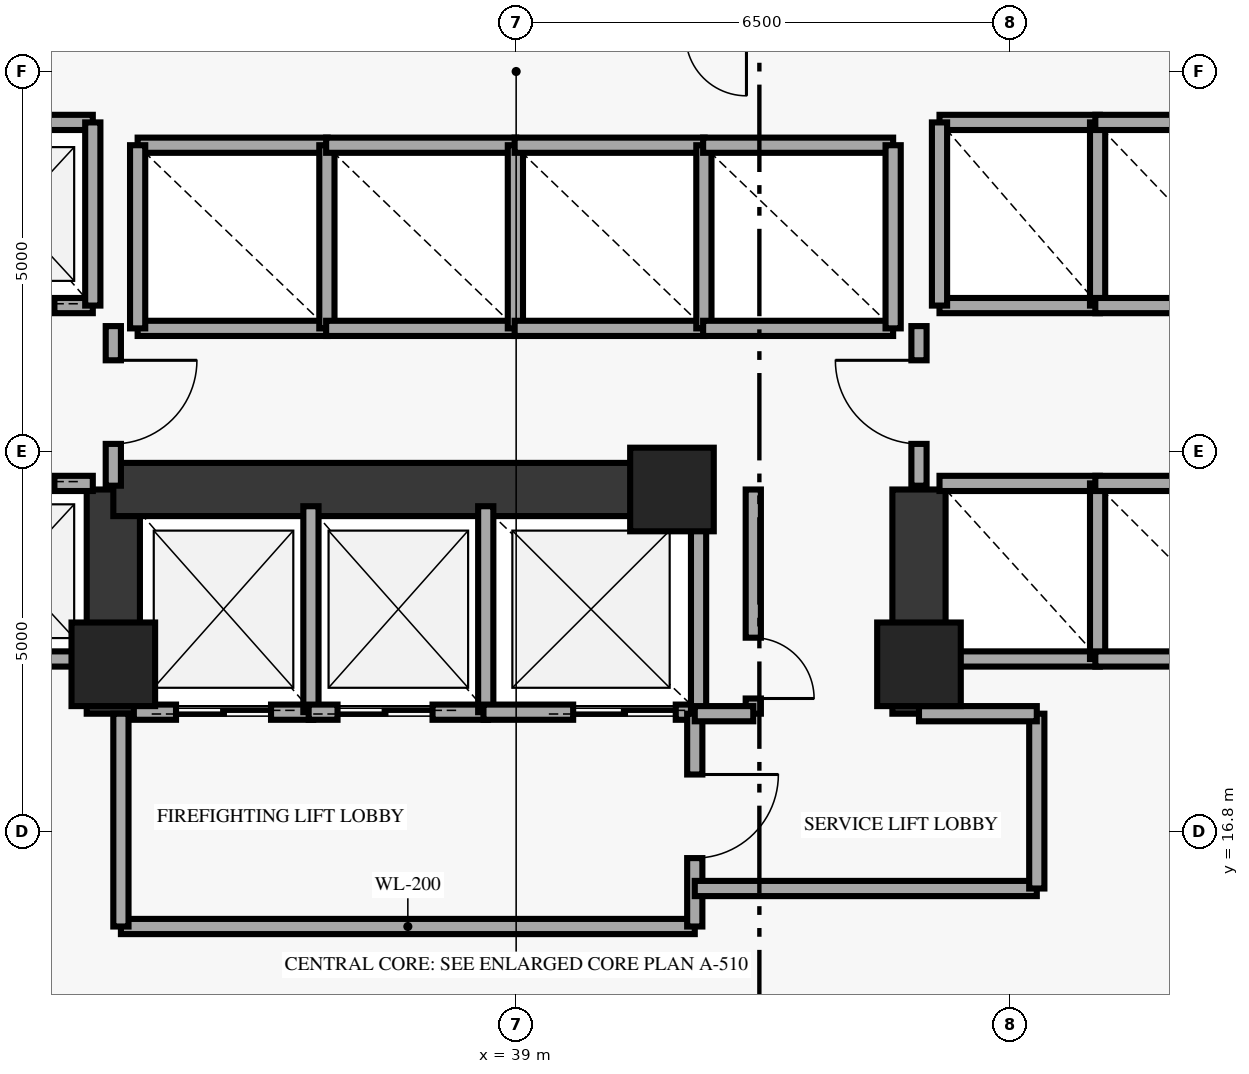
"""IFC4 building model, lengths in metres.
Left out: names, types, materials, properties, quantities, classifications, styles, units other than length and angle.
Written with IfcOpenShell. Run it as: python <this file> out.ifc"""

import sys

from ifc_helpers import new_model, si_unit, direction, frame, frame_2d, origin, origin_2d, place, context, subcontext, project, spatial, rectangle, extrude, element, fill, save


model = new_model("IFC4")
c1 = context("Model", 3, precision=1e-05, world=origin(), true_north=direction((0.0, 1.0)))
c2 = subcontext(c1, "Body", "Model", "MODEL_VIEW")
j1 = project(units=[si_unit("LENGTHUNIT", "METRE"), si_unit("PLANEANGLEUNIT", "RADIAN")], contexts=[c1])
p1 = place(None, origin())
s1 = spatial("IfcSite", under=j1, at=p1, CompositionType="ELEMENT")
p2 = place(p1, origin())
s2 = spatial("IfcBuilding", under=s1, at=p2, CompositionType="ELEMENT")
p3 = place(p2, frame((0.0, 0.0, 65.55)))
s3 = spatial("IfcBuildingStorey", under=s2, at=p3, CompositionType="ELEMENT", Elevation=65.55)
for number, where, z_axis, x_axis in (
    (1, (33.7, 19.0, 0.0), (0.0, 0.0, 1.0), (1.0, 0.0, 0.0)),
    (2, (41.05, 21.3, 0.0), (0.0, 0.0, 1.0), (1.0, 0.0, 0.0)),
    (3, (44.3, 19.0, 0.0), (0.0, 0.0, 1.0), (1.0, 0.0, 0.0)),
):
    element("IfcColumn", number, at=place(p3, frame(where, z_axis=z_axis, x_axis=x_axis)), inside=s3, PredefinedType="PILASTER", context=c2, shape_type="SweptSolid", body=[
        extrude(rectangle(XDim=1.1, YDim=1.1, at=origin_2d()), origin(), (0.0, 0.0, 1.0), 3.8),
    ])
for number, where, z_axis, x_axis in (
    (4, (33.7, 18.35, 0.0), (0.0, 0.0, 1.0), (0.0, 1.0, 0.0)),
    (5, (44.3, 18.35, 0.0), (0.0, 0.0, 1.0), (0.0, 1.0, 0.0)),
):
    element("IfcWall", number, at=place(p3, frame(where, z_axis=z_axis, x_axis=x_axis)), inside=s3, PredefinedType="SHEAR", context=c2, shape_type="SweptSolid", body=[
        extrude(rectangle(XDim=2.95, YDim=0.7, at=frame_2d((1.475, 0.0))), origin(), (0.0, 0.0, 1.0), 3.8),
    ])
p4 = place(p3, frame((33.7, 21.3, 0.0), z_axis=(0.0, 0.0, 1.0), x_axis=(1.0, 0.0, 0.0)))
e6 = element("IfcWall", 6, at=p4, inside=s3, PredefinedType="SHEAR", context=c2, shape_type="SweptSolid", body=[
    extrude(rectangle(XDim=7.55, YDim=0.7, at=frame_2d((3.775, 0.0))), origin(), (0.0, 0.0, 1.0), 3.8),
])
p5 = place(p3, frame((31.32, 23.72, 0.0), z_axis=(0.0, 0.0, 1.0), x_axis=(1.0, 0.0, 0.0)))
e7 = element("IfcWall", 7, at=p5, inside=s3, PredefinedType="SOLIDWALL", context=c2, shape_type="SweptSolid", body=[
    extrude(rectangle(XDim=2.11, YDim=0.2, at=frame_2d((1.055, 0.0))), origin(), (0.0, 0.0, 1.0), 3.8),
])
p6 = place(p5, frame((0.505, 0.0, 0.0)))
e8 = element("IfcOpeningElement", 8, at=p6, cuts=e7, PredefinedType="OPENING", context=c2, shape_type="SweptSolid", body=[
    extrude(rectangle(XDim=1.1, YDim=2.15, at=frame_2d((0.55, 1.075))), frame((0.0, 0.11, 0.0), z_axis=(0.0, -1.0, 0.0), x_axis=(1.0, 0.0, 0.0)), (0.0, 0.0, 1.0), 0.22),
])
p7 = place(p3, frame((31.32, 26.13, 0.0), z_axis=(0.0, 0.0, 1.0), x_axis=(1.0, 0.0, 0.0)))
e9 = element("IfcWall", 9, at=p7, inside=s3, PredefinedType="SOLIDWALL", context=c2, shape_type="SweptSolid", body=[
    extrude(rectangle(XDim=2.11, YDim=0.2, at=frame_2d((1.055, 0.0))), origin(), (0.0, 0.0, 1.0), 3.8),
])
p8 = place(p3, frame((33.43, 23.72, 0.0), z_axis=(0.0, 0.0, 1.0), x_axis=(0.0, 1.0, 0.0)))
e10 = element("IfcWall", 10, at=p8, inside=s3, PredefinedType="SOLIDWALL", context=c2, shape_type="SweptSolid", body=[
    extrude(rectangle(XDim=2.41, YDim=0.2, at=frame_2d((1.205, 0.0))), origin(), (0.0, 0.0, 1.0), 3.8),
])
p9 = place(p3, frame((31.32, 19.07, 0.0), z_axis=(0.0, 0.0, 1.0), x_axis=(1.0, 0.0, 0.0)))
e11 = element("IfcWall", 11, at=p9, inside=s3, PredefinedType="SOLIDWALL", context=c2, shape_type="SweptSolid", body=[
    extrude(rectangle(XDim=2.11, YDim=0.2, at=frame_2d((1.055, 0.0))), origin(), (0.0, 0.0, 1.0), 3.8),
])
p10 = place(p3, frame((31.32, 21.38, 0.0), z_axis=(0.0, 0.0, 1.0), x_axis=(1.0, 0.0, 0.0)))
e12 = element("IfcWall", 12, at=p10, inside=s3, PredefinedType="SOLIDWALL", context=c2, shape_type="SweptSolid", body=[
    extrude(rectangle(XDim=2.11, YDim=0.2, at=frame_2d((1.055, 0.0))), origin(), (0.0, 0.0, 1.0), 3.8),
])
p11 = place(p10, frame((0.505, 0.0, 0.0)))
e13 = element("IfcOpeningElement", 13, at=p11, cuts=e12, PredefinedType="OPENING", context=c2, shape_type="SweptSolid", body=[
    extrude(rectangle(XDim=1.1, YDim=2.15, at=frame_2d((0.55, 1.075))), frame((0.0, 0.11, 0.0), z_axis=(0.0, -1.0, 0.0), x_axis=(1.0, 0.0, 0.0)), (0.0, 0.0, 1.0), 0.22),
])
for number, where, z_axis, x_axis in (
    (14, (44.57, 23.72, 0.0), (0.0, 0.0, 1.0), (1.0, 0.0, 0.0)),
    (15, (44.57, 26.13, 0.0), (0.0, 0.0, 1.0), (1.0, 0.0, 0.0)),
):
    element("IfcWall", number, at=place(p3, frame(where, z_axis=z_axis, x_axis=x_axis)), inside=s3, PredefinedType="SOLIDWALL", context=c2, shape_type="SweptSolid", body=[
        extrude(rectangle(XDim=2.11, YDim=0.2, at=frame_2d((1.055, 0.0))), origin(), (0.0, 0.0, 1.0), 3.8),
    ])
for number, where, z_axis, x_axis in (
    (16, (44.57, 23.72, 0.0), (0.0, 0.0, 1.0), (0.0, 1.0, 0.0)),
    (17, (46.65, 23.72, 0.0), (0.0, 0.0, 1.0), (0.0, 1.0, 0.0)),
):
    element("IfcWall", number, at=place(p3, frame(where, z_axis=z_axis, x_axis=x_axis)), inside=s3, PredefinedType="SOLIDWALL", context=c2, shape_type="SweptSolid", body=[
        extrude(rectangle(XDim=2.41, YDim=0.2, at=frame_2d((1.205, 0.0))), origin(), (0.0, 0.0, 1.0), 3.8),
    ])
for number, where, z_axis, x_axis in (
    (18, (46.62, 23.72, 0.0), (0.0, 0.0, 1.0), (1.0, 0.0, 0.0)),
    (19, (46.62, 26.13, 0.0), (0.0, 0.0, 1.0), (1.0, 0.0, 0.0)),
):
    element("IfcWall", number, at=place(p3, frame(where, z_axis=z_axis, x_axis=x_axis)), inside=s3, PredefinedType="SOLIDWALL", context=c2, shape_type="SweptSolid", body=[
        extrude(rectangle(XDim=2.31, YDim=0.2, at=frame_2d((1.155, 0.0))), origin(), (0.0, 0.0, 1.0), 3.8),
    ])
for number, where, z_axis, x_axis in (
    (20, (44.57, 19.07, 0.0), (0.0, 0.0, 1.0), (1.0, 0.0, 0.0)),
    (21, (44.57, 21.38, 0.0), (0.0, 0.0, 1.0), (1.0, 0.0, 0.0)),
):
    element("IfcWall", number, at=place(p3, frame(where, z_axis=z_axis, x_axis=x_axis)), inside=s3, PredefinedType="SOLIDWALL", context=c2, shape_type="SweptSolid", body=[
        extrude(rectangle(XDim=2.11, YDim=0.2, at=frame_2d((1.055, 0.0))), origin(), (0.0, 0.0, 1.0), 3.8),
    ])
for number, where, z_axis, x_axis in (
    (22, (46.65, 19.07, 0.0), (0.0, 0.0, 1.0), (0.0, 1.0, 0.0)),
    (23, (46.62, 19.07, 0.0), (0.0, 0.0, 1.0), (1.0, 0.0, 0.0)),
    (24, (46.62, 21.38, 0.0), (0.0, 0.0, 1.0), (1.0, 0.0, 0.0)),
):
    element("IfcWall", number, at=place(p3, frame(where, z_axis=z_axis, x_axis=x_axis)), inside=s3, PredefinedType="SOLIDWALL", context=c2, shape_type="SweptSolid", body=[
        extrude(rectangle(XDim=2.31, YDim=0.2, at=frame_2d((1.155, 0.0))), origin(), (0.0, 0.0, 1.0), 3.8),
    ])
for number, where, z_axis, x_axis in (
    (25, (34.02, 23.42, 0.0), (0.0, 0.0, 1.0), (1.0, 0.0, 0.0)),
    (26, (34.02, 25.83, 0.0), (0.0, 0.0, 1.0), (1.0, 0.0, 0.0)),
):
    element("IfcWall", number, at=place(p3, frame(where, z_axis=z_axis, x_axis=x_axis)), inside=s3, PredefinedType="SOLIDWALL", context=c2, shape_type="SweptSolid", body=[
        extrude(rectangle(XDim=2.5, YDim=0.2, at=frame_2d((1.25, 0.0))), origin(), (0.0, 0.0, 1.0), 3.8),
    ])
for number, where, z_axis, x_axis in (
    (27, (34.02, 23.42, 0.0), (0.0, 0.0, 1.0), (0.0, 1.0, 0.0)),
    (28, (36.51, 23.42, 0.0), (0.0, 0.0, 1.0), (0.0, 1.0, 0.0)),
):
    element("IfcWall", number, at=place(p3, frame(where, z_axis=z_axis, x_axis=x_axis)), inside=s3, PredefinedType="SOLIDWALL", context=c2, shape_type="SweptSolid", body=[
        extrude(rectangle(XDim=2.41, YDim=0.2, at=frame_2d((1.205, 0.0))), origin(), (0.0, 0.0, 1.0), 3.8),
    ])
for number, where, z_axis, x_axis in (
    (29, (36.5, 23.42, 0.0), (0.0, 0.0, 1.0), (1.0, 0.0, 0.0)),
    (30, (36.5, 25.83, 0.0), (0.0, 0.0, 1.0), (1.0, 0.0, 0.0)),
):
    element("IfcWall", number, at=place(p3, frame(where, z_axis=z_axis, x_axis=x_axis)), inside=s3, PredefinedType="SOLIDWALL", context=c2, shape_type="SweptSolid", body=[
        extrude(rectangle(XDim=2.5, YDim=0.2, at=frame_2d((1.25, 0.0))), origin(), (0.0, 0.0, 1.0), 3.8),
    ])
p12 = place(p3, frame((38.99, 23.42, 0.0), z_axis=(0.0, 0.0, 1.0), x_axis=(0.0, 1.0, 0.0)))
e31 = element("IfcWall", 31, at=p12, inside=s3, PredefinedType="SOLIDWALL", context=c2, shape_type="SweptSolid", body=[
    extrude(rectangle(XDim=2.41, YDim=0.2, at=frame_2d((1.205, 0.0))), origin(), (0.0, 0.0, 1.0), 3.8),
])
for number, where, z_axis, x_axis in (
    (32, (38.98, 23.42, 0.0), (0.0, 0.0, 1.0), (1.0, 0.0, 0.0)),
    (33, (38.98, 25.83, 0.0), (0.0, 0.0, 1.0), (1.0, 0.0, 0.0)),
):
    element("IfcWall", number, at=place(p3, frame(where, z_axis=z_axis, x_axis=x_axis)), inside=s3, PredefinedType="SOLIDWALL", context=c2, shape_type="SweptSolid", body=[
        extrude(rectangle(XDim=2.5, YDim=0.2, at=frame_2d((1.25, 0.0))), origin(), (0.0, 0.0, 1.0), 3.8),
    ])
p13 = place(p3, frame((41.47, 23.42, 0.0), z_axis=(0.0, 0.0, 1.0), x_axis=(0.0, 1.0, 0.0)))
e34 = element("IfcWall", 34, at=p13, inside=s3, PredefinedType="SOLIDWALL", context=c2, shape_type="SweptSolid", body=[
    extrude(rectangle(XDim=2.41, YDim=0.2, at=frame_2d((1.205, 0.0))), origin(), (0.0, 0.0, 1.0), 3.8),
])
for number, where, z_axis, x_axis in (
    (35, (41.46, 23.42, 0.0), (0.0, 0.0, 1.0), (1.0, 0.0, 0.0)),
    (36, (41.46, 25.83, 0.0), (0.0, 0.0, 1.0), (1.0, 0.0, 0.0)),
):
    element("IfcWall", number, at=place(p3, frame(where, z_axis=z_axis, x_axis=x_axis)), inside=s3, PredefinedType="SOLIDWALL", context=c2, shape_type="SweptSolid", body=[
        extrude(rectangle(XDim=2.5, YDim=0.2, at=frame_2d((1.25, 0.0))), origin(), (0.0, 0.0, 1.0), 3.8),
    ])
p14 = place(p3, frame((43.96, 23.42, 0.0), z_axis=(0.0, 0.0, 1.0), x_axis=(0.0, 1.0, 0.0)))
e37 = element("IfcWall", 37, at=p14, inside=s3, PredefinedType="SOLIDWALL", context=c2, shape_type="SweptSolid", body=[
    extrude(rectangle(XDim=2.41, YDim=0.2, at=frame_2d((1.205, 0.0))), origin(), (0.0, 0.0, 1.0), 3.8),
])
p15 = place(p3, frame((33.97, 18.37, 0.0), z_axis=(0.0, 0.0, 1.0), x_axis=(1.0, 0.0, 0.0)))
e38 = element("IfcWall", 38, at=p15, inside=s3, PredefinedType="SOLIDWALL", context=c2, shape_type="SweptSolid", body=[
    extrude(rectangle(XDim=2.36, YDim=0.2, at=frame_2d((1.18, 0.0))), origin(), (0.0, 0.0, 1.0), 3.8),
])
p16 = place(p15, frame((0.555, 0.0, 0.0)))
e39 = element("IfcOpeningElement", 39, at=p16, cuts=e38, PredefinedType="OPENING", context=c2, shape_type="SweptSolid", body=[
    extrude(rectangle(XDim=1.25, YDim=2.2, at=frame_2d((0.625, 1.1))), frame((0.0, 0.11, 0.0), z_axis=(0.0, -1.0, 0.0), x_axis=(1.0, 0.0, 0.0)), (0.0, 0.0, 1.0), 0.22),
])
p17 = place(p3, frame((36.3, 18.37, 0.0), z_axis=(0.0, 0.0, 1.0), x_axis=(0.0, 1.0, 0.0)))
e40 = element("IfcWall", 40, at=p17, inside=s3, PredefinedType="SOLIDWALL", context=c2, shape_type="SweptSolid", body=[
    extrude(rectangle(XDim=2.71, YDim=0.2, at=frame_2d((1.355, 0.0))), origin(), (0.0, 0.0, 1.0), 3.8),
])
p18 = place(p3, frame((36.27, 18.37, 0.0), z_axis=(0.0, 0.0, 1.0), x_axis=(1.0, 0.0, 0.0)))
e41 = element("IfcWall", 41, at=p18, inside=s3, PredefinedType="SOLIDWALL", context=c2, shape_type="SweptSolid", body=[
    extrude(rectangle(XDim=2.36, YDim=0.2, at=frame_2d((1.18, 0.0))), origin(), (0.0, 0.0, 1.0), 3.8),
])
p19 = place(p18, frame((0.38, 0.0, 0.0)))
e42 = element("IfcOpeningElement", 42, at=p19, cuts=e41, PredefinedType="OPENING", context=c2, shape_type="SweptSolid", body=[
    extrude(rectangle(XDim=1.25, YDim=2.2, at=frame_2d((0.625, 1.1))), frame((0.0, 0.11, 0.0), z_axis=(0.0, -1.0, 0.0), x_axis=(1.0, 0.0, 0.0)), (0.0, 0.0, 1.0), 0.22),
])
p20 = place(p3, frame((38.6, 18.37, 0.0), z_axis=(0.0, 0.0, 1.0), x_axis=(0.0, 1.0, 0.0)))
e43 = element("IfcWall", 43, at=p20, inside=s3, PredefinedType="SOLIDWALL", context=c2, shape_type="SweptSolid", body=[
    extrude(rectangle(XDim=2.71, YDim=0.2, at=frame_2d((1.355, 0.0))), origin(), (0.0, 0.0, 1.0), 3.8),
])
p21 = place(p3, frame((38.57, 18.37, 0.0), z_axis=(0.0, 0.0, 1.0), x_axis=(1.0, 0.0, 0.0)))
e44 = element("IfcWall", 44, at=p21, inside=s3, PredefinedType="SOLIDWALL", context=c2, shape_type="SweptSolid", body=[
    extrude(rectangle(XDim=2.83, YDim=0.2, at=frame_2d((1.415, 0.0))), origin(), (0.0, 0.0, 1.0), 3.8),
])
p22 = place(p21, frame((1.18, 0.0, 0.0)))
e45 = element("IfcOpeningElement", 45, at=p22, cuts=e44, PredefinedType="OPENING", context=c2, shape_type="SweptSolid", body=[
    extrude(rectangle(XDim=1.35, YDim=2.18, at=frame_2d((0.675, 1.09))), frame((0.0, 0.11, 0.0), z_axis=(0.0, -1.0, 0.0), x_axis=(1.0, 0.0, 0.0)), (0.0, 0.0, 1.0), 0.22),
])
p23 = place(p3, frame((41.4, 18.37, 0.0), z_axis=(0.0, 0.0, 1.0), x_axis=(0.0, 1.0, 0.0)))
e46 = element("IfcWall", 46, at=p23, inside=s3, PredefinedType="SOLIDWALL", context=c2, shape_type="SweptSolid", body=[
    extrude(rectangle(XDim=2.71, YDim=0.2, at=frame_2d((1.355, 0.0))), origin(), (0.0, 0.0, 1.0), 3.8),
])
p24 = place(p3, frame((33.7, 21.35, 0.0), z_axis=(0.0, 0.0, 1.0), x_axis=(0.0, 1.0, 0.0)))
e47 = element("IfcWall", 47, at=p24, inside=s3, PredefinedType="SOLIDWALL", context=c2, shape_type="SweptSolid", body=[
    extrude(rectangle(XDim=2.1, YDim=0.2, at=frame_2d((1.05, 0.0))), origin(), (0.0, 0.0, 1.0), 3.02),
])
p25 = place(p24, frame((0.55, 0.0, 0.0)))
e48 = element("IfcOpeningElement", 48, at=p25, cuts=e47, PredefinedType="OPENING", context=c2, shape_type="SweptSolid", body=[
    extrude(rectangle(XDim=1.1, YDim=2.15, at=frame_2d((0.55, 1.075))), frame((0.0, 0.11, 0.0), z_axis=(0.0, -1.0, 0.0), x_axis=(1.0, 0.0, 0.0)), (0.0, 0.0, 1.0), 0.22),
])
p26 = place(p3, frame((44.3, 21.35, 0.0), z_axis=(0.0, 0.0, 1.0), x_axis=(0.0, 1.0, 0.0)))
e49 = element("IfcWall", 49, at=p26, inside=s3, PredefinedType="SOLIDWALL", context=c2, shape_type="SweptSolid", body=[
    extrude(rectangle(XDim=2.1, YDim=0.2, at=frame_2d((1.05, 0.0))), origin(), (0.0, 0.0, 1.0), 3.02),
])
p27 = place(p26, frame((0.55, 0.0, 0.0)))
e50 = element("IfcOpeningElement", 50, at=p27, cuts=e49, PredefinedType="OPENING", context=c2, shape_type="SweptSolid", body=[
    extrude(rectangle(XDim=1.1, YDim=2.15, at=frame_2d((0.55, 1.075))), frame((0.0, 0.11, 0.0), z_axis=(0.0, -1.0, 0.0), x_axis=(1.0, 0.0, 0.0)), (0.0, 0.0, 1.0), 0.22),
])
p28 = place(p3, frame((33.8, 15.55, 0.0), z_axis=(0.0, 0.0, 1.0), x_axis=(1.0, 0.0, 0.0)))
e51 = element("IfcWall", 51, at=p28, inside=s3, PredefinedType="SOLIDWALL", context=c2, shape_type="SweptSolid", body=[
    extrude(rectangle(XDim=7.55, YDim=0.2, at=frame_2d((3.775, 0.0))), origin(), (0.0, 0.0, 1.0), 3.8),
])
p29 = place(p3, frame((33.8, 15.55, 0.0), z_axis=(0.0, 0.0, 1.0), x_axis=(0.0, 1.0, 0.0)))
e52 = element("IfcWall", 52, at=p29, inside=s3, PredefinedType="SOLIDWALL", context=c2, shape_type="SweptSolid", body=[
    extrude(rectangle(XDim=2.8, YDim=0.2, at=frame_2d((1.4, 0.0))), origin(), (0.0, 0.0, 1.0), 3.8),
])
p30 = place(p3, frame((41.35, 15.55, 0.0), z_axis=(0.0, 0.0, 1.0), x_axis=(0.0, 1.0, 0.0)))
e53 = element("IfcWall", 53, at=p30, inside=s3, PredefinedType="SOLIDWALL", context=c2, shape_type="SweptSolid", body=[
    extrude(rectangle(XDim=2.8, YDim=0.2, at=frame_2d((1.4, 0.0))), origin(), (0.0, 0.0, 1.0), 3.8),
])
p31 = place(p30, frame((0.9, 0.0, 0.0)))
e54 = element("IfcOpeningElement", 54, at=p31, cuts=e53, PredefinedType="OPENING", context=c2, shape_type="SweptSolid", body=[
    extrude(rectangle(XDim=1.1, YDim=2.15, at=frame_2d((0.55, 1.075))), frame((0.0, 0.11, 0.0), z_axis=(0.0, -1.0, 0.0), x_axis=(1.0, 0.0, 0.0)), (0.0, 0.0, 1.0), 0.22),
])
p32 = place(p3, frame((41.35, 16.05, 0.0), z_axis=(0.0, 0.0, 1.0), x_axis=(1.0, 0.0, 0.0)))
e55 = element("IfcWall", 55, at=p32, inside=s3, PredefinedType="SOLIDWALL", context=c2, shape_type="SweptSolid", body=[
    extrude(rectangle(XDim=4.5, YDim=0.2, at=frame_2d((2.25, 0.0))), origin(), (0.0, 0.0, 1.0), 3.8),
])
p33 = place(p3, frame((45.85, 16.05, 0.0), z_axis=(0.0, 0.0, 1.0), x_axis=(0.0, 1.0, 0.0)))
e56 = element("IfcWall", 56, at=p33, inside=s3, PredefinedType="SOLIDWALL", context=c2, shape_type="SweptSolid", body=[
    extrude(rectangle(XDim=2.3, YDim=0.2, at=frame_2d((1.15, 0.0))), origin(), (0.0, 0.0, 1.0), 3.8),
])
p34 = place(p3, frame((44.3, 18.35, 0.0), z_axis=(0.0, 0.0, 1.0), x_axis=(1.0, 0.0, 0.0)))
e57 = element("IfcWall", 57, at=p34, inside=s3, PredefinedType="SOLIDWALL", context=c2, shape_type="SweptSolid", body=[
    extrude(rectangle(XDim=1.55, YDim=0.2, at=frame_2d((0.775, 0.0))), origin(), (0.0, 0.0, 1.0), 3.8),
])
p35 = place(p3, frame((42.12, 18.35, 0.0), z_axis=(0.0, 0.0, 1.0), x_axis=(0.0, 1.0, 0.0)))
e58 = element("IfcWall", 58, at=p35, inside=s3, PredefinedType="SOLIDWALL", context=c2, shape_type="SweptSolid", body=[
    extrude(rectangle(XDim=2.95, YDim=0.2, at=frame_2d((1.475, 0.0))), origin(), (0.0, 0.0, 1.0), 3.8),
])
p36 = place(p35, frame((0.2, 0.0, 0.0)))
e59 = element("IfcOpeningElement", 59, at=p36, cuts=e58, PredefinedType="OPENING", context=c2, shape_type="SweptSolid", body=[
    extrude(rectangle(XDim=0.8, YDim=2.05, at=frame_2d((0.4, 1.025))), frame((0.0, 0.11, 0.0), z_axis=(0.0, -1.0, 0.0), x_axis=(1.0, 0.0, 0.0)), (0.0, 0.0, 1.0), 0.22),
])
p37 = place(p3, frame((41.35, 18.35, 0.0), z_axis=(0.0, 0.0, 1.0), x_axis=(1.0, 0.0, 0.0)))
e60 = element("IfcWall", 60, at=p37, inside=s3, PredefinedType="SOLIDWALL", context=c2, shape_type="SweptSolid", body=[
    extrude(rectangle(XDim=0.77, YDim=0.2, at=frame_2d((0.385, 0.0))), origin(), (0.0, 0.0, 1.0), 3.8),
])
p38 = place(p3, frame((42.582, 11.365, 0.0), z_axis=(0.0, 0.0, 1.0), x_axis=(0.897055406153, 0.441918090025, 0.0)))
e61 = element("IfcWall", 61, at=p38, inside=s3, PredefinedType="PARTITIONING", context=c2, shape_type="SweptSolid", body=[
    extrude(rectangle(XDim=7.646, YDim=0.16, at=frame_2d((3.823, 0.0))), origin(), (0.0, 0.0, 1.0), 3.8),
])
p39 = place(p6, origin())
e62 = element("IfcDoor", 62, at=p39, inside=s3, OperationType="DOUBLE_DOOR_SLIDING", PredefinedType="DOOR", context=c2, shape_type="SweptSolid", body=[
    extrude(rectangle(XDim=1.1, YDim=2.15, at=frame_2d((0.55, 1.075))), frame((0.0, 0.025, 0.0), z_axis=(0.0, -1.0, 0.0), x_axis=(1.0, 0.0, 0.0)), (0.0, 0.0, 1.0), 0.05),
])
fill(e8, e62)
p40 = place(p11, origin())
e63 = element("IfcDoor", 63, at=p40, inside=s3, OperationType="DOUBLE_DOOR_SLIDING", PredefinedType="DOOR", context=c2, shape_type="SweptSolid", body=[
    extrude(rectangle(XDim=1.1, YDim=2.15, at=frame_2d((0.55, 1.075))), frame((0.0, 0.025, 0.0), z_axis=(0.0, -1.0, 0.0), x_axis=(1.0, 0.0, 0.0)), (0.0, 0.0, 1.0), 0.05),
])
fill(e13, e63)
p41 = place(p16, origin())
e64 = element("IfcDoor", 64, at=p41, inside=s3, OperationType="DOUBLE_DOOR_SLIDING", PredefinedType="DOOR", context=c2, shape_type="SweptSolid", body=[
    extrude(rectangle(XDim=1.25, YDim=2.2, at=frame_2d((0.625, 1.1))), frame((0.0, 0.025, 0.0), z_axis=(0.0, -1.0, 0.0), x_axis=(1.0, 0.0, 0.0)), (0.0, 0.0, 1.0), 0.05),
])
fill(e39, e64)
p42 = place(p19, origin())
e65 = element("IfcDoor", 65, at=p42, inside=s3, OperationType="DOUBLE_DOOR_SLIDING", PredefinedType="DOOR", context=c2, shape_type="SweptSolid", body=[
    extrude(rectangle(XDim=1.25, YDim=2.2, at=frame_2d((0.625, 1.1))), frame((0.0, 0.025, 0.0), z_axis=(0.0, -1.0, 0.0), x_axis=(1.0, 0.0, 0.0)), (0.0, 0.0, 1.0), 0.05),
])
fill(e42, e65)
p43 = place(p22, origin())
e66 = element("IfcDoor", 66, at=p43, inside=s3, OperationType="DOUBLE_DOOR_SLIDING", PredefinedType="DOOR", context=c2, shape_type="SweptSolid", body=[
    extrude(rectangle(XDim=1.35, YDim=2.18, at=frame_2d((0.675, 1.09))), frame((0.0, 0.025, 0.0), z_axis=(0.0, -1.0, 0.0), x_axis=(1.0, 0.0, 0.0)), (0.0, 0.0, 1.0), 0.05),
])
fill(e45, e66)
p44 = place(p25, origin())
e67 = element("IfcDoor", 67, at=p44, inside=s3, OperationType="SINGLE_SWING_RIGHT", PredefinedType="DOOR", context=c2, shape_type="SweptSolid", body=[
    extrude(rectangle(XDim=1.1, YDim=2.15, at=frame_2d((0.55, 1.075))), frame((0.0, 0.025, 0.0), z_axis=(0.0, -1.0, 0.0), x_axis=(1.0, 0.0, 0.0)), (0.0, 0.0, 1.0), 0.05),
])
fill(e48, e67)
p45 = place(p27, origin())
e68 = element("IfcDoor", 68, at=p45, inside=s3, OperationType="SINGLE_SWING_RIGHT", PredefinedType="DOOR", context=c2, shape_type="SweptSolid", body=[
    extrude(rectangle(XDim=1.1, YDim=2.15, at=frame_2d((0.55, 1.075))), frame((0.0, 0.025, 0.0), z_axis=(0.0, -1.0, 0.0), x_axis=(1.0, 0.0, 0.0)), (0.0, 0.0, 1.0), 0.05),
])
fill(e50, e68)
p46 = place(p31, origin())
e69 = element("IfcDoor", 69, at=p46, inside=s3, OperationType="SINGLE_SWING_RIGHT", PredefinedType="DOOR", context=c2, shape_type="SweptSolid", body=[
    extrude(rectangle(XDim=1.1, YDim=2.15, at=frame_2d((0.55, 1.075))), frame((0.0, 0.025, 0.0), z_axis=(0.0, -1.0, 0.0), x_axis=(1.0, 0.0, 0.0)), (0.0, 0.0, 1.0), 0.05),
])
fill(e54, e69)
p47 = place(p36, origin())
e70 = element("IfcDoor", 70, at=p47, inside=s3, OperationType="SINGLE_SWING_LEFT", PredefinedType="DOOR", context=c2, shape_type="SweptSolid", body=[
    extrude(rectangle(XDim=0.8, YDim=2.05, at=frame_2d((0.4, 1.025))), frame((0.0, 0.025, 0.0), z_axis=(0.0, -1.0, 0.0), x_axis=(1.0, 0.0, 0.0)), (0.0, 0.0, 1.0), 0.05),
])
fill(e59, e70)
save(model, sys.argv[1])
